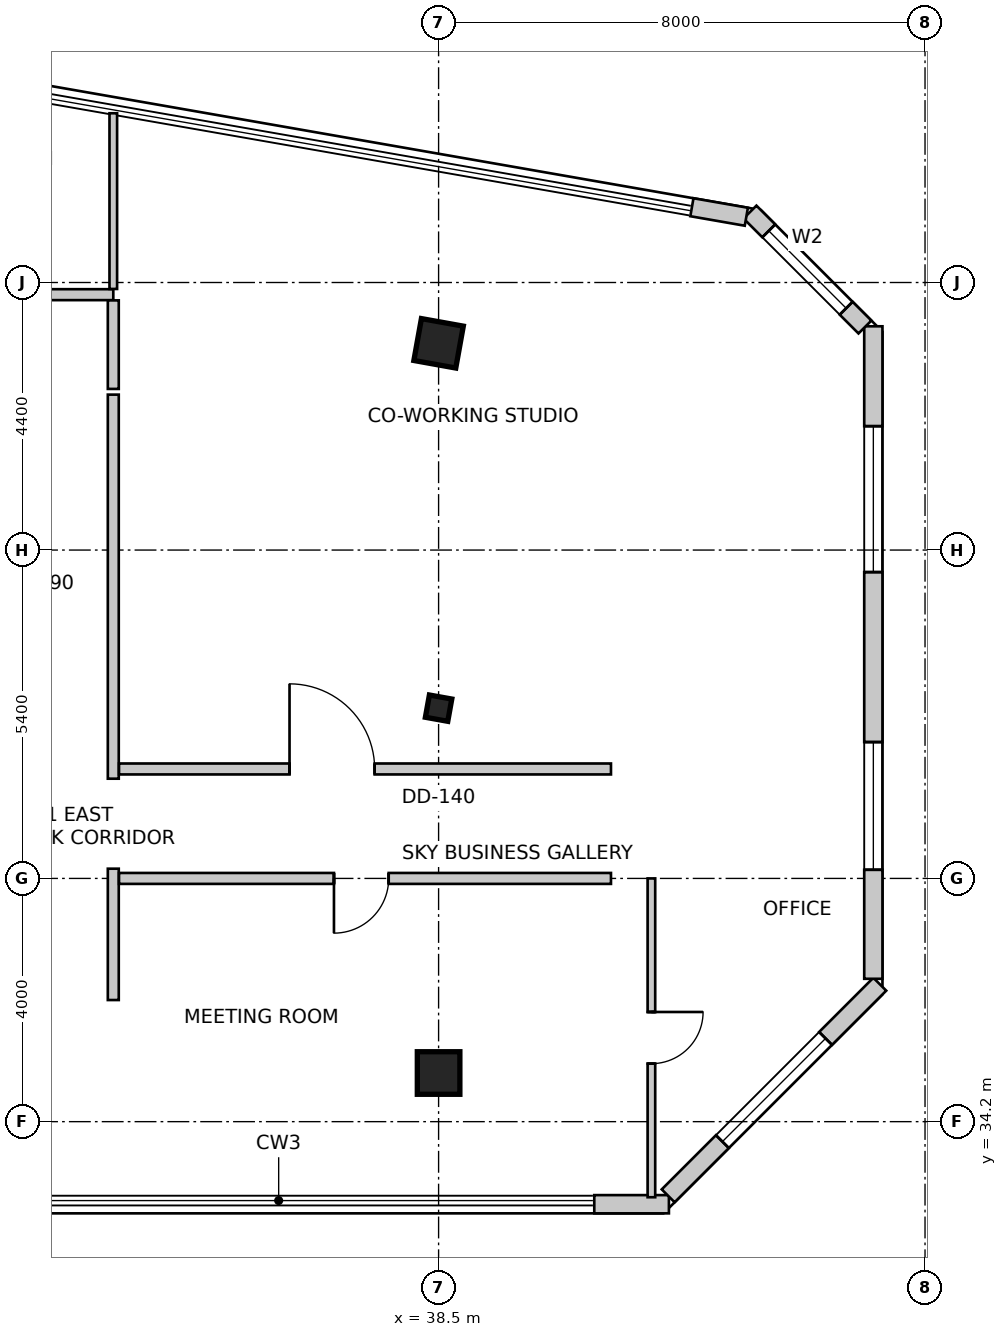
"""IFC4 building model, lengths in metres.
Left out: names, types, materials, properties, quantities, classifications, styles, units other than length and angle.
Written with IfcOpenShell. Run it as: python <this file> out.ifc"""

import sys

from ifc_helpers import new_model, si_unit, direction, frame, frame_2d, origin, origin_2d, place, context, subcontext, project, spatial, rectangle, i_section, extrude, source, transform, mapped, element, fill, save


model = new_model("IFC4")
c1 = context("Model", 3, precision=1e-05, world=origin(), true_north=direction((0.0, 1.0)))
c2 = subcontext(c1, "Body", "Model", "MODEL_VIEW")
j1 = project(units=[si_unit("LENGTHUNIT", "METRE"), si_unit("PLANEANGLEUNIT", "RADIAN")], contexts=[c1])
p1 = place(None, origin())
s1 = spatial("IfcSite", under=j1, at=p1, CompositionType="ELEMENT")
p2 = place(p1, origin())
s2 = spatial("IfcBuilding", under=s1, at=p2, CompositionType="ELEMENT")
p3 = place(p2, frame((0.0, 0.0, 239.4)))
s3 = spatial("IfcBuildingStorey", under=s2, at=p3, CompositionType="ELEMENT", Elevation=239.4)
m1 = source(origin(), c2, "Body", "SweptSolid", [
    extrude(rectangle(XDim=0.7, YDim=0.7, at=origin_2d()), origin(), (0.0, 0.0, 1.0), 3.5),
])
for number, where, z_axis, x_axis in (
    (1, (38.5, 47.0, 0.0), (0.0, 0.0, 1.0), (0.984, -0.177, 0.0)),
    (2, (38.5, 35.0, 0.0), (0.0, 0.0, 1.0), (1.0, 0.0, 0.0)),
):
    element("IfcColumn", number, at=place(p3, frame(where, z_axis=z_axis, x_axis=x_axis)), inside=s3, PredefinedType="COLUMN", context=c2, shape_type="MappedRepresentation", body=[
        mapped(m1, transform((0.0, 0.0, 0.0), scale=1.0)),
    ])
m2 = source(origin(), c2, "Body", "SweptSolid", [
    extrude(i_section(OverallWidth=0.374, OverallDepth=0.372, WebThickness=0.016, FlangeThickness=0.026, FilletRadius=0.015, at=origin_2d()), origin(), (0.0, 0.0, 1.0), 3.5),
])
p4 = place(p3, frame((38.5, 41.0, 0.0), z_axis=(0.0, 0.0, 1.0), x_axis=(0.984195607969, -0.17708474032, 0.0)))
e3 = element("IfcColumn", 3, at=p4, inside=s3, PredefinedType="COLUMN", context=c2, shape_type="MappedRepresentation", body=[
    mapped(m2, transform((0.0, 0.0, 0.0), scale=1.0)),
])
p5 = place(p3, frame((41.06, 32.842, 0.0), z_axis=(0.0, 0.0, 1.0), x_axis=(1.0, 0.0, 0.0)))
e4 = element("IfcWall", 4, at=p5, inside=s3, PredefinedType="SOLIDWALL", context=c2, shape_type="SweptSolid", body=[
    extrude(rectangle(XDim=1.228, YDim=0.3, at=frame_2d((0.614, 0.0))), origin(), (0.0, 0.0, 1.0), 3.2),
])
p6 = place(p3, frame((42.276, 32.98, 0.0), z_axis=(0.0, 0.0, 1.0), x_axis=(0.707106781187, 0.707106781187, 0.0)))
e5 = element("IfcWall", 5, at=p6, inside=s3, PredefinedType="SOLIDWALL", context=c2, shape_type="SweptSolid", body=[
    extrude(rectangle(XDim=4.922, YDim=0.3, at=frame_2d((2.461, 0.0))), origin(), (0.0, 0.0, 1.0), 3.2),
])
m3 = source(origin(), c2, "Body", "SweptSolid", [
    extrude(rectangle(XDim=2.4, YDim=2.2, at=frame_2d((1.2, 1.1))), frame((0.0, 0.16, 0.0), z_axis=(0.0, -1.0, 0.0), x_axis=(1.0, 0.0, 0.0)), (0.0, 0.0, 1.0), 0.32),
])
p7 = place(p6, frame((1.261, 0.0, 0.85)))
e6 = element("IfcOpeningElement", 6, at=p7, cuts=e5, PredefinedType="OPENING", context=c2, shape_type="MappedRepresentation", body=[
    mapped(m3, transform((0.0, 0.0, 0.0), scale=1.0)),
])
p8 = place(p3, frame((45.65, 36.549, 0.0), z_axis=(0.0, 0.0, 1.0), x_axis=(0.0, 1.0, 0.0)))
e7 = element("IfcWall", 7, at=p8, inside=s3, PredefinedType="SOLIDWALL", context=c2, shape_type="SweptSolid", body=[
    extrude(rectangle(XDim=10.73, YDim=0.3, at=frame_2d((5.365, 0.0))), origin(), (0.0, 0.0, 1.0), 3.2),
])
m4 = source(origin(), c2, "Body", "SweptSolid", [
    extrude(rectangle(XDim=2.1, YDim=2.0, at=frame_2d((1.05, 1.0))), frame((0.0, 0.16, 0.0), z_axis=(0.0, -1.0, 0.0), x_axis=(1.0, 0.0, 0.0)), (0.0, 0.0, 1.0), 0.32),
])
p9 = place(p8, frame((1.793, 0.0, 0.85)))
e8 = element("IfcOpeningElement", 8, at=p9, cuts=e7, PredefinedType="OPENING", context=c2, shape_type="MappedRepresentation", body=[
    mapped(m4, transform((0.0, 0.0, 0.0), scale=1.0)),
])
p10 = place(p8, frame((6.688, 0.0, 0.85)))
e9 = element("IfcOpeningElement", 9, at=p10, cuts=e7, PredefinedType="OPENING", context=c2, shape_type="MappedRepresentation", body=[
    mapped(m3, transform((0.0, 0.0, 0.0), scale=1.0)),
])
p11 = place(p3, frame((45.512, 47.268, 0.0), z_axis=(0.0, 0.0, 1.0), x_axis=(-0.707106781187, 0.707106781187, 0.0)))
e10 = element("IfcWall", 10, at=p11, inside=s3, PredefinedType="SOLIDWALL", context=c2, shape_type="SweptSolid", body=[
    extrude(rectangle(XDim=2.674, YDim=0.3, at=frame_2d((1.337, 0.0))), origin(), (0.0, 0.0, 1.0), 3.2),
])
m5 = source(origin(), c2, "Body", "SweptSolid", [
    extrude(rectangle(XDim=1.8, YDim=2.1, at=frame_2d((0.9, 1.05))), frame((0.0, 0.16, 0.0), z_axis=(0.0, -1.0, 0.0), x_axis=(1.0, 0.0, 0.0)), (0.0, 0.0, 1.0), 0.32),
])
p12 = place(p11, frame((0.437, 0.0, 0.85)))
e11 = element("IfcOpeningElement", 11, at=p12, cuts=e10, PredefinedType="OPENING", context=c2, shape_type="MappedRepresentation", body=[
    mapped(m5, transform((0.0, 0.0, 0.0), scale=1.0)),
])
p13 = place(p3, frame((43.561, 49.081, 0.0), z_axis=(0.0, 0.0, 1.0), x_axis=(-0.985063518612, 0.172191359539, 0.0)))
e12 = element("IfcWall", 12, at=p13, inside=s3, PredefinedType="SOLIDWALL", context=c2, shape_type="SweptSolid", body=[
    extrude(rectangle(XDim=0.909, YDim=0.3, at=frame_2d((0.455, 0.0))), origin(), (0.0, 0.0, 1.0), 3.2),
])
p14 = place(p3, frame((28.362, 47.8, 0.0), z_axis=(0.0, 0.0, 1.0), x_axis=(1.0, 0.0, 0.0)))
e13 = element("IfcWall", 13, at=p14, inside=s3, PredefinedType="PARTITIONING", context=c2, shape_type="SweptSolid", body=[
    extrude(rectangle(XDim=4.788, YDim=0.18, at=frame_2d((2.394, 0.0))), origin(), (0.0, 0.0, 1.0), 2.729),
])
m6 = source(origin(), c2, "Body", "SweptSolid", [
    extrude(rectangle(XDim=0.85, YDim=2.15, at=frame_2d((0.425, 1.075))), frame((0.0, 0.1, 0.0), z_axis=(0.0, -1.0, 0.0), x_axis=(1.0, 0.0, 0.0)), (0.0, 0.0, 1.0), 0.2),
])
p15 = place(p14, frame((0.401, 0.0, 0.0)))
e14 = element("IfcOpeningElement", 14, at=p15, cuts=e13, PredefinedType="OPENING", context=c2, shape_type="MappedRepresentation", body=[
    mapped(m6, transform((0.0, 0.0, 0.0), scale=1.0)),
])
p16 = place(p3, frame((33.15, 47.706, 0.0), z_axis=(0.0, 0.0, 1.0), x_axis=(0.0, -1.0, 0.0)))
e15 = element("IfcWall", 15, at=p16, inside=s3, PredefinedType="PARTITIONING", context=c2, shape_type="SweptSolid", body=[
    extrude(rectangle(XDim=1.456, YDim=0.18, at=frame_2d((0.728, 0.0))), origin(), (0.0, 0.0, 1.0), 2.869),
])
p17 = place(p3, frame((33.15, 46.156, 0.0), z_axis=(0.0, 0.0, 1.0), x_axis=(0.0, -1.0, 0.0)))
e16 = element("IfcWall", 16, at=p17, inside=s3, PredefinedType="PARTITIONING", context=c2, shape_type="SweptSolid", body=[
    extrude(rectangle(XDim=6.316, YDim=0.18, at=frame_2d((3.158, 0.0))), origin(), (0.0, 0.0, 1.0), 2.729),
])
p18 = place(p3, frame((33.15, 38.36, 0.0), z_axis=(0.0, 0.0, 1.0), x_axis=(0.0, -1.0, 0.0)))
e17 = element("IfcWall", 17, at=p18, inside=s3, PredefinedType="PARTITIONING", context=c2, shape_type="SweptSolid", body=[
    extrude(rectangle(XDim=2.16, YDim=0.18, at=frame_2d((1.08, 0.0))), origin(), (0.0, 0.0, 1.0), 3.2),
])
p19 = place(p3, frame((33.15, 50.783, 0.0), z_axis=(0.0, 0.0, 1.0), x_axis=(0.0, -1.0, 0.0)))
e18 = element("IfcWall", 18, at=p19, inside=s3, PredefinedType="PARTITIONING", context=c2, shape_type="SweptSolid", body=[
    extrude(rectangle(XDim=2.889, YDim=0.125, at=frame_2d((1.445, 0.0))), origin(), (0.0, 0.0, 1.0), 2.492),
])
p20 = place(p3, frame((33.244, 40.0, 0.0), z_axis=(0.0, 0.0, 1.0), x_axis=(1.0, 0.0, 0.0)))
e19 = element("IfcWall", 19, at=p20, inside=s3, PredefinedType="PARTITIONING", context=c2, shape_type="SweptSolid", body=[
    extrude(rectangle(XDim=8.091, YDim=0.18, at=frame_2d((4.045, 0.0))), origin(), (0.0, 0.0, 1.0), 2.716),
])
m7 = source(origin(), c2, "Body", "SweptSolid", [
    extrude(rectangle(XDim=1.4, YDim=2.15, at=frame_2d((0.7, 1.075))), frame((0.0, 0.1, 0.0), z_axis=(0.0, -1.0, 0.0), x_axis=(1.0, 0.0, 0.0)), (0.0, 0.0, 1.0), 0.2),
])
p21 = place(p20, frame((2.804, 0.0, 0.0)))
e20 = element("IfcOpeningElement", 20, at=p21, cuts=e19, PredefinedType="OPENING", context=c2, shape_type="MappedRepresentation", body=[
    mapped(m7, transform((0.0, 0.0, 0.0), scale=1.0)),
])
p22 = place(p3, frame((41.335, 38.2, 0.0), z_axis=(0.0, 0.0, 1.0), x_axis=(-1.0, 0.0, 0.0)))
e21 = element("IfcWall", 21, at=p22, inside=s3, PredefinedType="PARTITIONING", context=c2, shape_type="SweptSolid", body=[
    extrude(rectangle(XDim=8.091, YDim=0.18, at=frame_2d((4.045, 0.0))), origin(), (0.0, 0.0, 1.0), 2.716),
])
m8 = source(origin(), c2, "Body", "SweptSolid", [
    extrude(rectangle(XDim=0.9, YDim=2.15, at=frame_2d((0.45, 1.075))), frame((0.0, 0.1, 0.0), z_axis=(0.0, -1.0, 0.0), x_axis=(1.0, 0.0, 0.0)), (0.0, 0.0, 1.0), 0.2),
])
p23 = place(p22, frame((3.656, 0.0, 0.0)))
e22 = element("IfcOpeningElement", 22, at=p23, cuts=e21, PredefinedType="OPENING", context=c2, shape_type="MappedRepresentation", body=[
    mapped(m8, transform((0.0, 0.0, 0.0), scale=1.0)),
])
p24 = place(p3, frame((42.0, 38.2, 0.0), z_axis=(0.0, 0.0, 1.0), x_axis=(0.0, -1.0, 0.0)))
e23 = element("IfcWall", 23, at=p24, inside=s3, PredefinedType="PARTITIONING", context=c2, shape_type="SweptSolid", body=[
    extrude(rectangle(XDim=5.243, YDim=0.125, at=frame_2d((2.622, 0.0))), origin(), (0.0, 0.0, 1.0), 3.2),
])
m9 = source(origin(), c2, "Body", "SweptSolid", [
    extrude(rectangle(XDim=0.85, YDim=2.15, at=frame_2d((0.425, 1.075))), frame((0.0, 0.073, 0.0), z_axis=(0.0, -1.0, 0.0), x_axis=(1.0, 0.0, 0.0)), (0.0, 0.0, 1.0), 0.145),
])
p25 = place(p24, frame((2.197, 0.0, 0.0)))
e24 = element("IfcOpeningElement", 24, at=p25, cuts=e23, PredefinedType="OPENING", context=c2, shape_type="MappedRepresentation", body=[
    mapped(m9, transform((0.0, 0.0, 0.0), scale=1.0)),
])
m10 = source(origin(), c2, "Body", "SweptSolid", [
    extrude(rectangle(XDim=2.4, YDim=2.2, at=frame_2d((1.2, 1.1))), frame((0.0, -0.015, 0.0), z_axis=(0.0, -1.0, 0.0), x_axis=(1.0, 0.0, 0.0)), (0.0, 0.0, 1.0), 0.06),
])
p26 = place(p7, origin())
e25 = element("IfcWindow", 25, at=p26, inside=s3, PartitioningType="SINGLE_PANEL", PredefinedType="WINDOW", context=c2, shape_type="MappedRepresentation", body=[
    mapped(m10, transform((0.0, 0.0, 0.0), scale=1.0)),
])
fill(e6, e25)
m11 = source(origin(), c2, "Body", "SweptSolid", [
    extrude(rectangle(XDim=2.1, YDim=2.0, at=frame_2d((1.05, 1.0))), frame((0.0, -0.015, 0.0), z_axis=(0.0, -1.0, 0.0), x_axis=(1.0, 0.0, 0.0)), (0.0, 0.0, 1.0), 0.06),
])
p27 = place(p9, origin())
e26 = element("IfcWindow", 26, at=p27, inside=s3, PartitioningType="SINGLE_PANEL", PredefinedType="WINDOW", context=c2, shape_type="MappedRepresentation", body=[
    mapped(m11, transform((0.0, 0.0, 0.0), scale=1.0)),
])
fill(e8, e26)
p28 = place(p10, origin())
e27 = element("IfcWindow", 27, at=p28, inside=s3, PartitioningType="SINGLE_PANEL", PredefinedType="WINDOW", context=c2, shape_type="MappedRepresentation", body=[
    mapped(m10, transform((0.0, 0.0, 0.0), scale=1.0)),
])
fill(e9, e27)
m12 = source(origin(), c2, "Body", "SweptSolid", [
    extrude(rectangle(XDim=1.8, YDim=2.1, at=frame_2d((0.9, 1.05))), frame((0.0, -0.015, 0.0), z_axis=(0.0, -1.0, 0.0), x_axis=(1.0, 0.0, 0.0)), (0.0, 0.0, 1.0), 0.06),
])
p29 = place(p12, origin())
e28 = element("IfcWindow", 28, at=p29, inside=s3, PartitioningType="SINGLE_PANEL", PredefinedType="WINDOW", context=c2, shape_type="MappedRepresentation", body=[
    mapped(m12, transform((0.0, 0.0, 0.0), scale=1.0)),
])
fill(e11, e28)
m13 = source(origin(), c2, "Body", "SweptSolid", [
    extrude(rectangle(XDim=1.4, YDim=2.15, at=frame_2d((0.7, 1.075))), frame((0.0, 0.025, 0.0), z_axis=(0.0, -1.0, 0.0), x_axis=(1.0, 0.0, 0.0)), (0.0, 0.0, 1.0), 0.05),
])
p30 = place(p21, origin())
e29 = element("IfcDoor", 29, at=p30, inside=s3, OperationType="SINGLE_SWING_LEFT", PredefinedType="DOOR", context=c2, shape_type="MappedRepresentation", body=[
    mapped(m13, transform((0.0, 0.0, 0.0), scale=1.0)),
])
fill(e20, e29)
m14 = source(origin(), c2, "Body", "SweptSolid", [
    extrude(rectangle(XDim=0.9, YDim=2.15, at=frame_2d((0.45, 1.075))), frame((0.0, 0.025, 0.0), z_axis=(0.0, -1.0, 0.0), x_axis=(1.0, 0.0, 0.0)), (0.0, 0.0, 1.0), 0.05),
])
p31 = place(p23, origin())
e30 = element("IfcDoor", 30, at=p31, inside=s3, OperationType="SINGLE_SWING_RIGHT", PredefinedType="DOOR", context=c2, shape_type="MappedRepresentation", body=[
    mapped(m14, transform((0.0, 0.0, 0.0), scale=1.0)),
])
fill(e22, e30)
m15 = source(origin(), c2, "Body", "SweptSolid", [
    extrude(rectangle(XDim=0.85, YDim=2.15, at=frame_2d((0.425, 1.075))), frame((0.0, 0.025, 0.0), z_axis=(0.0, -1.0, 0.0), x_axis=(1.0, 0.0, 0.0)), (0.0, 0.0, 1.0), 0.05),
])
p32 = place(p25, origin())
e31 = element("IfcDoor", 31, at=p32, inside=s3, OperationType="SINGLE_SWING_LEFT", PredefinedType="DOOR", context=c2, shape_type="MappedRepresentation", body=[
    mapped(m15, transform((0.0, 0.0, 0.0), scale=1.0)),
])
fill(e24, e31)
save(model, sys.argv[1])
